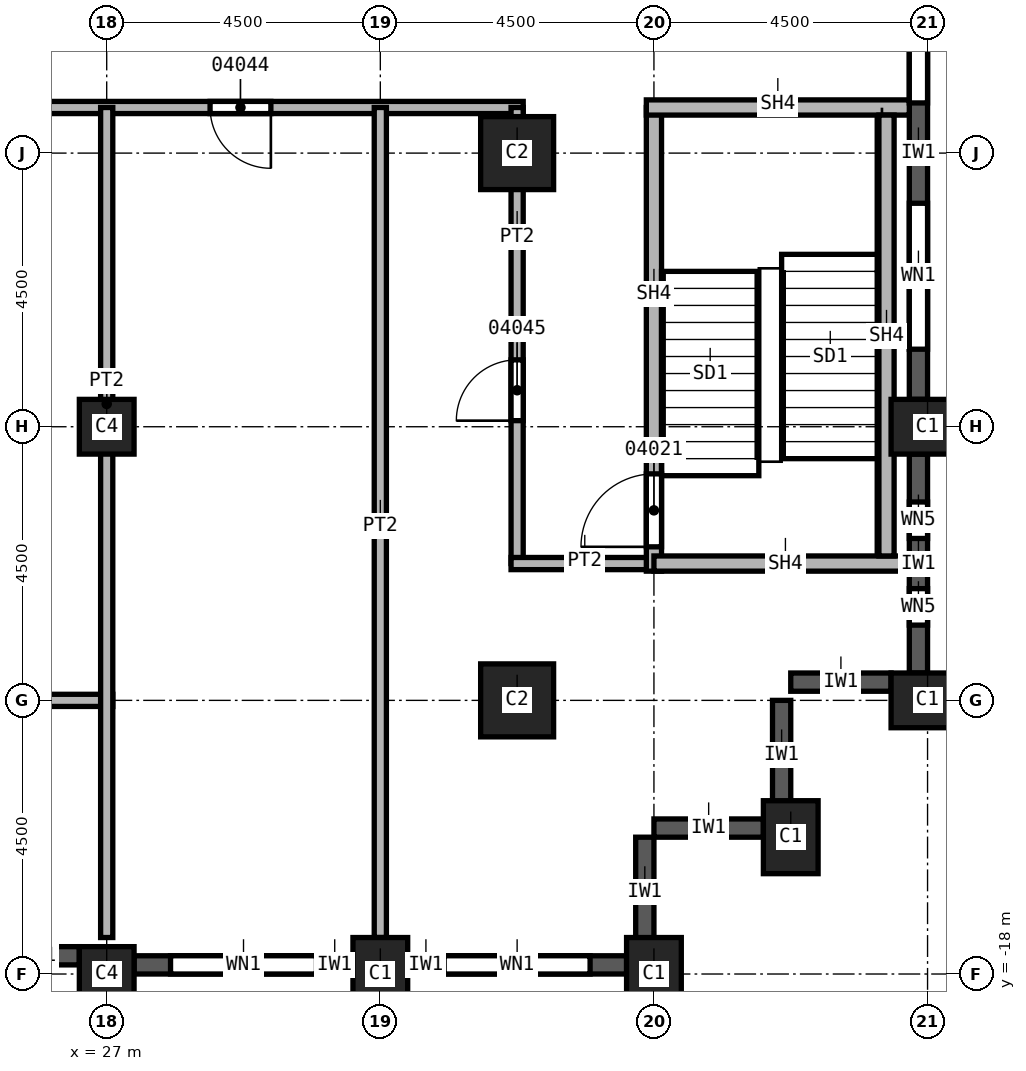
"""IFC4 building model, lengths in metres.
Left out: names, types, materials, properties, quantities, classifications, styles, units other than length and angle.
Written with IfcOpenShell. Run it as: python <this file> out.ifc"""

import sys

from ifc_helpers import new_model, si_unit, direction, frame, frame_2d, origin, origin_2d, place, context, subcontext, project, spatial, rectangle, extrude, element, fill, save


model = new_model("IFC4")
c1 = context("Model", 3, precision=1e-05, world=origin(), true_north=direction((0.0, 1.0)))
c2 = subcontext(c1, "Body", "Model", "MODEL_VIEW")
j1 = project(units=[si_unit("LENGTHUNIT", "METRE"), si_unit("PLANEANGLEUNIT", "RADIAN")], contexts=[c1])
p1 = place(None, origin())
s1 = spatial("IfcSite", under=j1, at=p1, CompositionType="ELEMENT")
p2 = place(p1, origin())
s2 = spatial("IfcBuilding", under=s1, at=p2, CompositionType="ELEMENT")
p3 = place(p2, frame((0.0, 0.0, 108.0)))
s3 = spatial("IfcBuildingStorey", under=s2, at=p3, CompositionType="ELEMENT", Elevation=108.0)
for number, where, z_axis, x_axis in (
    (1, (40.5, -9.0, 0.0), (0.0, 0.0, 1.0), (0.0, 1.0, 0.0)),
    (2, (40.5, -13.5, 0.0), (0.0, 0.0, 1.0), (0.0, 1.0, 0.0)),
    (3, (38.25, -15.75, 0.0), (0.0, 0.0, 1.0), (1.0, 0.0, 0.0)),
    (4, (31.5, -18.0, 0.0), (0.0, 0.0, 1.0), (1.0, 0.0, 0.0)),
    (5, (36.0, -18.0, 0.0), (0.0, 0.0, 1.0), (1.0, 0.0, 0.0)),
):
    element("IfcColumn", number, at=place(p3, frame(where, z_axis=z_axis, x_axis=x_axis)), inside=s3, PredefinedType="COLUMN", context=c2, shape_type="SweptSolid", body=[
        extrude(rectangle(XDim=0.9, YDim=1.2, at=origin_2d()), origin(), (0.0, 0.0, 1.0), 3.7),
    ])
for number, where, z_axis, x_axis in (
    (6, (33.75, -4.5, 0.0), (0.0, 0.0, 1.0), (1.0, 0.0, 0.0)),
    (7, (33.75, -13.5, 0.0), (0.0, 0.0, 1.0), (1.0, 0.0, 0.0)),
):
    element("IfcColumn", number, at=place(p3, frame(where, z_axis=z_axis, x_axis=x_axis)), inside=s3, PredefinedType="COLUMN", context=c2, shape_type="SweptSolid", body=[
        extrude(rectangle(XDim=1.2, YDim=1.2, at=origin_2d()), origin(), (0.0, 0.0, 1.0), 3.7),
    ])
for number, where, z_axis, x_axis in (
    (8, (27.0, -9.0, 0.0), (0.0, 0.0, 1.0), (1.0, 0.0, 0.0)),
    (9, (27.0, -18.0, 0.0), (0.0, 0.0, 1.0), (1.0, 0.0, 0.0)),
):
    element("IfcColumn", number, at=place(p3, frame(where, z_axis=z_axis, x_axis=x_axis)), inside=s3, PredefinedType="COLUMN", context=c2, shape_type="SweptSolid", body=[
        extrude(rectangle(XDim=0.9, YDim=0.9, at=origin_2d()), origin(), (0.0, 0.0, 1.0), 3.7),
    ])
for number, where, z_axis, x_axis in (
    (10, (35.85, -17.55, 0.0), (0.0, 0.0, 1.0), (0.0, 1.0, 0.0)),
    (11, (37.8, -15.6, 0.0), (0.0, 0.0, 1.0), (-1.0, 0.0, 0.0)),
    (12, (38.1, -15.3, 0.0), (0.0, 0.0, 1.0), (0.0, 1.0, 0.0)),
):
    element("IfcWall", number, at=place(p3, frame(where, z_axis=z_axis, x_axis=x_axis)), inside=s3, PredefinedType="SOLIDWALL", context=c2, shape_type="SweptSolid", body=[
        extrude(rectangle(XDim=1.8, YDim=0.3, at=frame_2d((0.9, 0.0))), origin(), (0.0, 0.0, 1.0), 3.1),
    ])
p4 = place(p3, frame((39.9, -13.2, 0.0), z_axis=(0.0, 0.0, 1.0), x_axis=(-1.0, 0.0, 0.0)))
e13 = element("IfcWall", 13, at=p4, inside=s3, PredefinedType="SOLIDWALL", context=c2, shape_type="SweptSolid", body=[
    extrude(rectangle(XDim=1.65, YDim=0.3, at=frame_2d((0.825, 0.0))), origin(), (0.0, 0.0, 1.0), 3.1),
])
p5 = place(p3, frame((25.2, -17.7, 0.0), z_axis=(0.0, 0.0, 1.0), x_axis=(1.0, 0.0, 0.0)))
e14 = element("IfcWall", 14, at=p5, inside=s3, PredefinedType="SOLIDWALL", context=c2, shape_type="SweptSolid", body=[
    extrude(rectangle(XDim=1.35, YDim=0.3, at=frame_2d((0.675, 0.0))), origin(), (0.0, 0.0, 1.0), 3.1),
])
p6 = place(p3, frame((27.45, -17.85, 0.0), z_axis=(0.0, 0.0, 1.0), x_axis=(1.0, 0.0, 0.0)))
e15 = element("IfcWall", 15, at=p6, inside=s3, PredefinedType="SOLIDWALL", context=c2, shape_type="SweptSolid", body=[
    extrude(rectangle(XDim=3.6, YDim=0.3, at=frame_2d((1.8, 0.0))), origin(), (0.0, 0.0, 1.0), 3.1),
])
p7 = place(p6, frame((0.6, 0.0, 0.8)))
e16 = element("IfcOpeningElement", 16, at=p7, cuts=e15, PredefinedType="OPENING", context=c2, shape_type="SweptSolid", body=[
    extrude(rectangle(XDim=2.4, YDim=1.95, at=frame_2d((1.2, 0.975))), frame((0.0, 0.15, 0.0), z_axis=(0.0, -1.0, 0.0), x_axis=(1.0, 0.0, 0.0)), (0.0, 0.0, 1.0), 0.3),
])
p8 = place(p3, frame((31.95, -17.85, 0.0), z_axis=(0.0, 0.0, 1.0), x_axis=(1.0, 0.0, 0.0)))
e17 = element("IfcWall", 17, at=p8, inside=s3, PredefinedType="SOLIDWALL", context=c2, shape_type="SweptSolid", body=[
    extrude(rectangle(XDim=3.6, YDim=0.3, at=frame_2d((1.8, 0.0))), origin(), (0.0, 0.0, 1.0), 3.1),
])
p9 = place(p8, frame((0.6, 0.0, 0.8)))
e18 = element("IfcOpeningElement", 18, at=p9, cuts=e17, PredefinedType="OPENING", context=c2, shape_type="SweptSolid", body=[
    extrude(rectangle(XDim=2.4, YDim=1.95, at=frame_2d((1.2, 0.975))), frame((0.0, 0.15, 0.0), z_axis=(0.0, -1.0, 0.0), x_axis=(1.0, 0.0, 0.0)), (0.0, 0.0, 1.0), 0.3),
])
p10 = place(p3, frame((40.35, -13.05, 0.0), z_axis=(0.0, 0.0, 1.0), x_axis=(0.0, 1.0, 0.0)))
e19 = element("IfcWall", 19, at=p10, inside=s3, PredefinedType="SOLIDWALL", context=c2, shape_type="SweptSolid", body=[
    extrude(rectangle(XDim=3.6, YDim=0.3, at=frame_2d((1.8, 0.0))), origin(), (0.0, 0.0, 1.0), 3.1),
])
p11 = place(p10, frame((0.788, 0.0, 0.8)))
e20 = element("IfcOpeningElement", 20, at=p11, cuts=e19, PredefinedType="OPENING", context=c2, shape_type="SweptSolid", body=[
    extrude(rectangle(XDim=0.6, YDim=1.95, at=frame_2d((0.3, 0.975))), frame((0.0, 0.15, 0.0), z_axis=(0.0, -1.0, 0.0), x_axis=(1.0, 0.0, 0.0)), (0.0, 0.0, 1.0), 0.3),
])
p12 = place(p10, frame((2.212, 0.0, 0.8)))
e21 = element("IfcOpeningElement", 21, at=p12, cuts=e19, PredefinedType="OPENING", context=c2, shape_type="SweptSolid", body=[
    extrude(rectangle(XDim=0.6, YDim=1.95, at=frame_2d((0.3, 0.975))), frame((0.0, 0.15, 0.0), z_axis=(0.0, -1.0, 0.0), x_axis=(1.0, 0.0, 0.0)), (0.0, 0.0, 1.0), 0.3),
])
p13 = place(p3, frame((40.35, -8.55, 0.0), z_axis=(0.0, 0.0, 1.0), x_axis=(0.0, 1.0, 0.0)))
e22 = element("IfcWall", 22, at=p13, inside=s3, PredefinedType="SOLIDWALL", context=c2, shape_type="SweptSolid", body=[
    extrude(rectangle(XDim=8.1, YDim=0.3, at=frame_2d((4.05, 0.0))), origin(), (0.0, 0.0, 1.0), 3.1),
])
p14 = place(p13, frame((0.825, 0.0, 0.8)))
e23 = element("IfcOpeningElement", 23, at=p14, cuts=e22, PredefinedType="OPENING", context=c2, shape_type="SweptSolid", body=[
    extrude(rectangle(XDim=2.4, YDim=1.95, at=frame_2d((1.2, 0.975))), frame((0.0, 0.15, 0.0), z_axis=(0.0, -1.0, 0.0), x_axis=(1.0, 0.0, 0.0)), (0.0, 0.0, 1.0), 0.3),
])
p15 = place(p13, frame((4.875, 0.0, 0.8)))
e24 = element("IfcOpeningElement", 24, at=p15, cuts=e22, PredefinedType="OPENING", context=c2, shape_type="SweptSolid", body=[
    extrude(rectangle(XDim=2.4, YDim=1.95, at=frame_2d((1.2, 0.975))), frame((0.0, 0.15, 0.0), z_axis=(0.0, -1.0, 0.0), x_axis=(1.0, 0.0, 0.0)), (0.0, 0.0, 1.0), 0.3),
])
p16 = place(p3, frame((15.4, -13.5, 0.0), z_axis=(0.0, 0.0, 1.0), x_axis=(1.0, 0.0, 0.0)))
e25 = element("IfcWall", 25, at=p16, inside=s3, PredefinedType="PARTITIONING", context=c2, shape_type="SweptSolid", body=[
    extrude(rectangle(XDim=11.7, YDim=0.2, at=frame_2d((5.85, 0.0))), origin(), (0.0, 0.0, 1.0), 3.7),
])
p17 = place(p3, frame((33.85, -3.75, 0.0), z_axis=(0.0, 0.0, 1.0), x_axis=(-1.0, 0.0, 0.0)))
e26 = element("IfcWall", 26, at=p17, inside=s3, PredefinedType="PARTITIONING", context=c2, shape_type="SweptSolid", body=[
    extrude(rectangle(XDim=18.45, YDim=0.2, at=frame_2d((9.225, 0.0))), origin(), (0.0, 0.0, 1.0), 3.7),
])
p18 = place(p17, frame((4.15, 0.0, 0.0)))
e27 = element("IfcOpeningElement", 27, at=p18, cuts=e26, PredefinedType="OPENING", context=c2, shape_type="SweptSolid", body=[
    extrude(rectangle(XDim=1.0, YDim=2.1, at=frame_2d((0.5, 1.05))), frame((0.0, 0.1, 0.0), z_axis=(0.0, -1.0, 0.0), x_axis=(1.0, 0.0, 0.0)), (0.0, 0.0, 1.0), 0.2),
])
for number, where, z_axis, x_axis in (
    (28, (27.0, -3.75, 0.0), (0.0, 0.0, 1.0), (0.0, -1.0, 0.0)),
    (29, (31.5, -3.75, 0.0), (0.0, 0.0, 1.0), (0.0, -1.0, 0.0)),
):
    element("IfcWall", number, at=place(p3, frame(where, z_axis=z_axis, x_axis=x_axis)), inside=s3, PredefinedType="PARTITIONING", context=c2, shape_type="SweptSolid", body=[
        extrude(rectangle(XDim=13.65, YDim=0.2, at=frame_2d((6.825, 0.0))), origin(), (0.0, 0.0, 1.0), 3.7),
    ])
p19 = place(p3, frame((33.75, -11.25, 0.0), z_axis=(0.0, 0.0, 1.0), x_axis=(0.0, 1.0, 0.0)))
e30 = element("IfcWall", 30, at=p19, inside=s3, PredefinedType="PARTITIONING", context=c2, shape_type="SweptSolid", body=[
    extrude(rectangle(XDim=7.5, YDim=0.2, at=frame_2d((3.75, 0.0))), origin(), (0.0, 0.0, 1.0), 3.7),
])
p20 = place(p19, frame((2.35, 0.0, 0.0)))
e31 = element("IfcOpeningElement", 31, at=p20, cuts=e30, PredefinedType="OPENING", context=c2, shape_type="SweptSolid", body=[
    extrude(rectangle(XDim=1.0, YDim=2.1, at=frame_2d((0.5, 1.05))), frame((0.0, 0.1, 0.0), z_axis=(0.0, -1.0, 0.0), x_axis=(1.0, 0.0, 0.0)), (0.0, 0.0, 1.0), 0.2),
])
p21 = place(p3, frame((36.0, -11.25, 0.0), z_axis=(0.0, 0.0, 1.0), x_axis=(-1.0, 0.0, 0.0)))
e32 = element("IfcWall", 32, at=p21, inside=s3, PredefinedType="PARTITIONING", context=c2, shape_type="SweptSolid", body=[
    extrude(rectangle(XDim=2.35, YDim=0.2, at=frame_2d((1.175, 0.0))), origin(), (0.0, 0.0, 1.0), 3.7),
])
p22 = place(p3, frame((36.0, -11.375, 0.0), z_axis=(0.0, 0.0, 1.0), x_axis=(0.0, 1.0, 0.0)))
e33 = element("IfcWall", 33, at=p22, inside=s3, PredefinedType="SOLIDWALL", context=c2, shape_type="SweptSolid", body=[
    extrude(rectangle(XDim=7.625, YDim=0.25, at=frame_2d((3.812, 0.0))), origin(), (0.0, 0.0, 1.0), 3.7),
])
p23 = place(p22, frame((0.4, 0.0, 0.0)))
e34 = element("IfcOpeningElement", 34, at=p23, cuts=e33, PredefinedType="OPENING", context=c2, shape_type="SweptSolid", body=[
    extrude(rectangle(XDim=1.2, YDim=2.1, at=frame_2d((0.6, 1.05))), frame((0.0, 0.125, 0.0), z_axis=(0.0, -1.0, 0.0), x_axis=(1.0, 0.0, 0.0)), (0.0, 0.0, 1.0), 0.25),
])
p24 = place(p3, frame((40.2, -11.25, 0.0), z_axis=(0.0, 0.0, 1.0), x_axis=(-1.0, 0.0, 0.0)))
e35 = element("IfcWall", 35, at=p24, inside=s3, PredefinedType="SOLIDWALL", context=c2, shape_type="SweptSolid", body=[
    extrude(rectangle(XDim=4.2, YDim=0.25, at=frame_2d((2.1, 0.0))), origin(), (0.0, 0.0, 1.0), 3.7),
])
p25 = place(p3, frame((40.2, -3.75, 0.0), z_axis=(0.0, 0.0, 1.0), x_axis=(-1.0, 0.0, 0.0)))
e36 = element("IfcWall", 36, at=p25, inside=s3, PredefinedType="SOLIDWALL", context=c2, shape_type="SweptSolid", body=[
    extrude(rectangle(XDim=4.325, YDim=0.25, at=frame_2d((2.163, 0.0))), origin(), (0.0, 0.0, 1.0), 3.7),
])
p26 = place(p3, frame((39.825, -11.125, 0.0), z_axis=(0.0, 0.0, 1.0), x_axis=(0.0, 1.0, 0.0)))
e37 = element("IfcWall", 37, at=p26, inside=s3, PredefinedType="SOLIDWALL", context=c2, shape_type="SweptSolid", body=[
    extrude(rectangle(XDim=7.25, YDim=0.25, at=frame_2d((3.625, 0.0))), origin(), (0.0, 0.0, 1.0), 3.7),
])
p27 = place(p7, origin())
e38 = element("IfcWindow", 38, at=p27, inside=s3, PartitioningType="SINGLE_PANEL", PredefinedType="WINDOW", context=c2, shape_type="SweptSolid", body=[
    extrude(rectangle(XDim=2.4, YDim=1.95, at=frame_2d((1.2, 0.975))), frame((0.0, 0.03, 0.0), z_axis=(0.0, -1.0, 0.0), x_axis=(1.0, 0.0, 0.0)), (0.0, 0.0, 1.0), 0.06),
])
fill(e16, e38)
p28 = place(p9, origin())
e39 = element("IfcWindow", 39, at=p28, inside=s3, PartitioningType="SINGLE_PANEL", PredefinedType="WINDOW", context=c2, shape_type="SweptSolid", body=[
    extrude(rectangle(XDim=2.4, YDim=1.95, at=frame_2d((1.2, 0.975))), frame((0.0, 0.03, 0.0), z_axis=(0.0, -1.0, 0.0), x_axis=(1.0, 0.0, 0.0)), (0.0, 0.0, 1.0), 0.06),
])
fill(e18, e39)
p29 = place(p14, origin())
e40 = element("IfcWindow", 40, at=p29, inside=s3, PartitioningType="SINGLE_PANEL", PredefinedType="WINDOW", context=c2, shape_type="SweptSolid", body=[
    extrude(rectangle(XDim=2.4, YDim=1.95, at=frame_2d((1.2, 0.975))), frame((0.0, 0.03, 0.0), z_axis=(0.0, -1.0, 0.0), x_axis=(1.0, 0.0, 0.0)), (0.0, 0.0, 1.0), 0.06),
])
fill(e23, e40)
p30 = place(p15, origin())
e41 = element("IfcWindow", 41, at=p30, inside=s3, PartitioningType="SINGLE_PANEL", PredefinedType="WINDOW", context=c2, shape_type="SweptSolid", body=[
    extrude(rectangle(XDim=2.4, YDim=1.95, at=frame_2d((1.2, 0.975))), frame((0.0, 0.03, 0.0), z_axis=(0.0, -1.0, 0.0), x_axis=(1.0, 0.0, 0.0)), (0.0, 0.0, 1.0), 0.06),
])
fill(e24, e41)
p31 = place(p23, origin())
e42 = element("IfcDoor", 42, at=p31, inside=s3, OperationType="SINGLE_SWING_RIGHT", PredefinedType="DOOR", context=c2, shape_type="SweptSolid", body=[
    extrude(rectangle(XDim=1.2, YDim=2.1, at=frame_2d((0.6, 1.05))), frame((0.0, 0.025, 0.0), z_axis=(0.0, -1.0, 0.0), x_axis=(1.0, 0.0, 0.0)), (0.0, 0.0, 1.0), 0.05),
])
fill(e34, e42)
p32 = place(p18, origin())
e43 = element("IfcDoor", 43, at=p32, inside=s3, OperationType="SINGLE_SWING_LEFT", PredefinedType="DOOR", context=c2, shape_type="SweptSolid", body=[
    extrude(rectangle(XDim=1.0, YDim=2.1, at=frame_2d((0.5, 1.05))), frame((0.0, 0.025, 0.0), z_axis=(0.0, -1.0, 0.0), x_axis=(1.0, 0.0, 0.0)), (0.0, 0.0, 1.0), 0.05),
])
fill(e27, e43)
p33 = place(p20, origin())
e44 = element("IfcDoor", 44, at=p33, inside=s3, OperationType="SINGLE_SWING_RIGHT", PredefinedType="DOOR", context=c2, shape_type="SweptSolid", body=[
    extrude(rectangle(XDim=1.0, YDim=2.1, at=frame_2d((0.5, 1.05))), frame((0.0, 0.025, 0.0), z_axis=(0.0, -1.0, 0.0), x_axis=(1.0, 0.0, 0.0)), (0.0, 0.0, 1.0), 0.05),
])
fill(e31, e44)
p34 = place(p11, origin())
e45 = element("IfcWindow", 45, at=p34, inside=s3, PartitioningType="SINGLE_PANEL", PredefinedType="WINDOW", context=c2, shape_type="SweptSolid", body=[
    extrude(rectangle(XDim=0.6, YDim=1.95, at=frame_2d((0.3, 0.975))), frame((0.0, 0.03, 0.0), z_axis=(0.0, -1.0, 0.0), x_axis=(1.0, 0.0, 0.0)), (0.0, 0.0, 1.0), 0.06),
])
fill(e20, e45)
p35 = place(p12, origin())
e46 = element("IfcWindow", 46, at=p35, inside=s3, PartitioningType="SINGLE_PANEL", PredefinedType="WINDOW", context=c2, shape_type="SweptSolid", body=[
    extrude(rectangle(XDim=0.6, YDim=1.95, at=frame_2d((0.3, 0.975))), frame((0.0, 0.03, 0.0), z_axis=(0.0, -1.0, 0.0), x_axis=(1.0, 0.0, 0.0)), (0.0, 0.0, 1.0), 0.06),
])
fill(e21, e46)
save(model, sys.argv[1])
